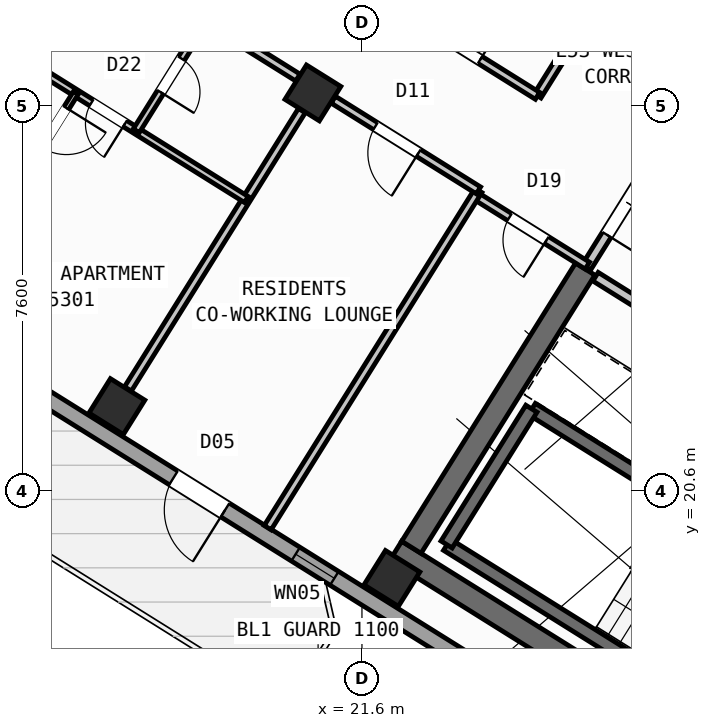
"""IFC4 building model, lengths in metres.
Left out: names, types, materials, properties, quantities, classifications, styles, units other than length and angle.
Written with IfcOpenShell. Run it as: python <this file> out.ifc"""

import sys

from ifc_helpers import new_model, si_unit, direction, frame, frame_2d, origin, origin_2d, place, context, subcontext, project, spatial, rectangle, hollow_rectangle, extrude, source, transform, mapped, element, fill, save


model = new_model("IFC4")
c1 = context("Model", 3, precision=1e-05, world=origin(), true_north=direction((0.0, 1.0)))
c2 = subcontext(c1, "Body", "Model", "MODEL_VIEW")
j1 = project(units=[si_unit("LENGTHUNIT", "METRE"), si_unit("PLANEANGLEUNIT", "RADIAN")], contexts=[c1])
p1 = place(None, origin())
s1 = spatial("IfcSite", under=j1, at=p1, CompositionType="ELEMENT")
p2 = place(p1, origin())
s2 = spatial("IfcBuilding", under=s1, at=p2, CompositionType="ELEMENT")
p3 = place(p2, frame((0.0, 0.0, 211.2)))
s3 = spatial("IfcBuildingStorey", under=s2, at=p3, CompositionType="ELEMENT", Elevation=211.2)
p4 = place(p3, frame((33.324, 12.503, 0.0), z_axis=(0.0, 0.0, 1.0), x_axis=(-0.848043529849, 0.529926571782, 0.0)))
e1 = element("IfcWall", 1, at=p4, inside=s3, PredefinedType="SHEAR", context=c2, shape_type="SweptSolid", body=[
    extrude(rectangle(XDim=13.04, YDim=0.45, at=frame_2d((6.52, 0.0))), origin(), (0.0, 0.0, 1.0), 3.35),
])
p5 = place(p3, frame((26.007, 24.976, 0.0), z_axis=(0.0, 0.0, 1.0), x_axis=(-0.529931155655, -0.848040665456, 0.0)))
e2 = element("IfcWall", 2, at=p5, inside=s3, PredefinedType="SHEAR", context=c2, shape_type="SweptSolid", body=[
    extrude(rectangle(XDim=6.475, YDim=0.45, at=frame_2d((3.238, 0.0))), origin(), (0.0, 0.0, 1.0), 3.35),
])
m1 = source(origin(), c2, "Body", "SweptSolid", [
    extrude(hollow_rectangle(XDim=0.8, YDim=0.8, WallThickness=0.032, at=origin_2d()), origin(), (0.0, 0.0, 1.0), 3.6),
])
for number, where, z_axis, x_axis in (
    (3, (22.191, 18.87, 0.0), (0.0, 0.0, 1.0), (-0.848, 0.53, 0.0)),
    (4, (20.632, 28.452, 0.0), (0.0, 0.0, 1.0), (-0.848, 0.53, 0.0)),
    (5, (16.764, 22.261, 0.0), (0.0, 0.0, 1.0), (-0.848, 0.53, 0.0)),
):
    element("IfcColumn", number, at=place(p3, frame(where, z_axis=z_axis, x_axis=x_axis)), inside=s3, PredefinedType="COLUMN", context=c2, shape_type="MappedRepresentation", body=[
        mapped(m1, transform((0.0, 0.0, 0.0), scale=1.0)),
    ])
p6 = place(p3, frame((31.76, 12.183, 0.0), z_axis=(0.0, 0.0, 1.0), x_axis=(-0.848047074256, 0.529920899612, 0.0)))
e6 = element("IfcWall", 6, at=p6, inside=s3, PredefinedType="STANDARD", context=c2, shape_type="SweptSolid", body=[
    extrude(rectangle(XDim=30.652, YDim=0.32, at=frame_2d((15.326, 0.0))), origin(), (0.0, 0.0, 1.0), 3.35),
])
p7 = place(p6, frame((15.166, 0.0, 0.0)))
e7 = element("IfcOpeningElement", 7, at=p7, cuts=e6, PredefinedType="OPENING", context=c2, shape_type="SweptSolid", body=[
    extrude(rectangle(XDim=1.2, YDim=2.15, at=frame_2d((0.6, 1.075))), frame((0.0, 0.17, 0.0), z_axis=(0.0, -1.0, 0.0), x_axis=(1.0, 0.0, 0.0)), (0.0, 0.0, 1.0), 0.34),
])
p8 = place(p6, frame((2.24, 0.0, 0.9)))
e8 = element("IfcOpeningElement", 8, at=p8, cuts=e6, PredefinedType="OPENING", context=c2, shape_type="SweptSolid", body=[
    extrude(rectangle(XDim=1.65, YDim=1.45, at=frame_2d((0.825, 0.725))), frame((0.0, 0.17, 0.0), z_axis=(0.0, -1.0, 0.0), x_axis=(1.0, 0.0, 0.0)), (0.0, 0.0, 1.0), 0.34),
])
p9 = place(p6, frame((7.469, 0.0, 0.9)))
e9 = element("IfcOpeningElement", 9, at=p9, cuts=e6, PredefinedType="OPENING", context=c2, shape_type="SweptSolid", body=[
    extrude(rectangle(XDim=1.65, YDim=1.45, at=frame_2d((0.825, 0.725))), frame((0.0, 0.17, 0.0), z_axis=(0.0, -1.0, 0.0), x_axis=(1.0, 0.0, 0.0)), (0.0, 0.0, 1.0), 0.34),
])
p10 = place(p6, frame((12.623, 0.0, 1.0)))
e10 = element("IfcOpeningElement", 10, at=p10, cuts=e6, PredefinedType="OPENING", context=c2, shape_type="SweptSolid", body=[
    extrude(rectangle(XDim=0.9, YDim=1.25, at=frame_2d((0.45, 0.625))), frame((0.0, 0.17, 0.0), z_axis=(0.0, -1.0, 0.0), x_axis=(1.0, 0.0, 0.0)), (0.0, 0.0, 1.0), 0.34),
])
p11 = place(p6, frame((19.715, 0.0, 1.0)))
e11 = element("IfcOpeningElement", 11, at=p11, cuts=e6, PredefinedType="OPENING", context=c2, shape_type="SweptSolid", body=[
    extrude(rectangle(XDim=0.9, YDim=1.25, at=frame_2d((0.45, 0.625))), frame((0.0, 0.17, 0.0), z_axis=(0.0, -1.0, 0.0), x_axis=(1.0, 0.0, 0.0)), (0.0, 0.0, 1.0), 0.34),
])
p12 = place(p6, frame((25.566, 0.0, 0.9)))
e12 = element("IfcOpeningElement", 12, at=p12, cuts=e6, PredefinedType="OPENING", context=c2, shape_type="SweptSolid", body=[
    extrude(rectangle(XDim=1.65, YDim=1.45, at=frame_2d((0.825, 0.725))), frame((0.0, 0.17, 0.0), z_axis=(0.0, -1.0, 0.0), x_axis=(1.0, 0.0, 0.0)), (0.0, 0.0, 1.0), 0.34),
])
p13 = place(p6, frame((28.896, 0.0, 1.0)))
e13 = element("IfcOpeningElement", 13, at=p13, cuts=e6, PredefinedType="OPENING", context=c2, shape_type="SweptSolid", body=[
    extrude(rectangle(XDim=0.9, YDim=1.25, at=frame_2d((0.45, 0.625))), frame((0.0, 0.17, 0.0), z_axis=(0.0, -1.0, 0.0), x_axis=(1.0, 0.0, 0.0)), (0.0, 0.0, 1.0), 0.34),
])
p14 = place(p3, frame((5.7, 28.71, 0.0), z_axis=(0.0, 0.0, 1.0), x_axis=(0.529923711467, 0.8480453172, 0.0)))
e14 = element("IfcWall", 14, at=p14, inside=s3, PredefinedType="STANDARD", context=c2, shape_type="SweptSolid", body=[
    extrude(rectangle(XDim=21.587, YDim=0.32, at=frame_2d((10.794, 0.0))), origin(), (0.0, 0.0, 1.0), 2.825),
])
p15 = place(p14, frame((2.184, 0.0, 0.9)))
e15 = element("IfcOpeningElement", 15, at=p15, cuts=e14, PredefinedType="OPENING", context=c2, shape_type="SweptSolid", body=[
    extrude(rectangle(XDim=1.65, YDim=1.45, at=frame_2d((0.825, 0.725))), frame((0.0, 0.17, 0.0), z_axis=(0.0, -1.0, 0.0), x_axis=(1.0, 0.0, 0.0)), (0.0, 0.0, 1.0), 0.34),
])
p16 = place(p14, frame((11.709, 0.0, 0.9)))
e16 = element("IfcOpeningElement", 16, at=p16, cuts=e14, PredefinedType="OPENING", context=c2, shape_type="SweptSolid", body=[
    extrude(rectangle(XDim=1.35, YDim=1.45, at=frame_2d((0.675, 0.725))), frame((0.0, 0.17, 0.0), z_axis=(0.0, -1.0, 0.0), x_axis=(1.0, 0.0, 0.0)), (0.0, 0.0, 1.0), 0.34),
])
p17 = place(p14, frame((17.181, 0.0, 0.95)))
e17 = element("IfcOpeningElement", 17, at=p17, cuts=e14, PredefinedType="OPENING", context=c2, shape_type="SweptSolid", body=[
    extrude(rectangle(XDim=1.95, YDim=1.35, at=frame_2d((0.975, 0.675))), frame((0.0, 0.17, 0.0), z_axis=(0.0, -1.0, 0.0), x_axis=(1.0, 0.0, 0.0)), (0.0, 0.0, 1.0), 0.34),
])
p18 = place(p3, frame((29.605, 15.581, 0.0), z_axis=(0.0, 0.0, 1.0), x_axis=(-0.848036911448, 0.529937163087, 0.0)))
e18 = element("IfcWall", 18, at=p18, inside=s3, PredefinedType="SHEAR", context=c2, shape_type="SweptSolid", body=[
    extrude(rectangle(XDim=7.46, YDim=0.26, at=frame_2d((3.73, 0.0))), origin(), (0.0, 0.0, 1.0), 3.35),
])
p19 = place(p3, frame((31.28, 18.261, 0.0), z_axis=(0.0, 0.0, 1.0), x_axis=(-0.848051618787, 0.529913626805, 0.0)))
e19 = element("IfcWall", 19, at=p19, inside=s3, PredefinedType="SHEAR", context=c2, shape_type="SweptSolid", body=[
    extrude(rectangle(XDim=7.46, YDim=0.26, at=frame_2d((3.73, 0.0))), origin(), (0.0, 0.0, 1.0), 3.35),
])
p20 = place(p19, frame((0.36, 0.0, 0.0)))
e20 = element("IfcOpeningElement", 20, at=p20, cuts=e19, PredefinedType="OPENING", context=c2, shape_type="SweptSolid", body=[
    extrude(rectangle(XDim=0.86, YDim=2.05, at=frame_2d((0.43, 1.025))), frame((0.0, 0.14, 0.0), z_axis=(0.0, -1.0, 0.0), x_axis=(1.0, 0.0, 0.0)), (0.0, 0.0, 1.0), 0.28),
])
p21 = place(p3, frame((24.945, 22.22, 0.0), z_axis=(0.0, 0.0, 1.0), x_axis=(-0.529908658664, -0.84805472316, 0.0)))
e21 = element("IfcWall", 21, at=p21, inside=s3, PredefinedType="SHEAR", context=c2, shape_type="SweptSolid", body=[
    extrude(rectangle(XDim=3.16, YDim=0.26, at=frame_2d((1.58, 0.0))), origin(), (0.0, 0.0, 1.0), 3.35),
])
p22 = place(p3, frame((31.525, 21.504, 0.0), z_axis=(0.0, 0.0, 1.0), x_axis=(-0.848042066329, 0.529928913853, 0.0)))
e22 = element("IfcWall", 22, at=p22, inside=s3, PredefinedType="STANDARD", context=c2, shape_type="SweptSolid", body=[
    extrude(rectangle(XDim=6.268, YDim=0.2, at=frame_2d((3.134, 0.0))), origin(), (0.0, 0.0, 1.0), 3.34),
])
p23 = place(p22, frame((4.4, 0.0, 0.0)))
e23 = element("IfcOpeningElement", 23, at=p23, cuts=e22, PredefinedType="OPENING", context=c2, shape_type="SweptSolid", body=[
    extrude(rectangle(XDim=0.86, YDim=2.05, at=frame_2d((0.43, 1.025))), frame((0.0, 0.11, 0.0), z_axis=(0.0, -1.0, 0.0), x_axis=(1.0, 0.0, 0.0)), (0.0, 0.0, 1.0), 0.22),
])
p24 = place(p22, frame((1.45, 0.0, 0.0)))
e24 = element("IfcOpeningElement", 24, at=p24, cuts=e22, PredefinedType="OPENING", context=c2, shape_type="SweptSolid", body=[
    extrude(rectangle(XDim=0.86, YDim=2.05, at=frame_2d((0.43, 1.025))), frame((0.0, 0.11, 0.0), z_axis=(0.0, -1.0, 0.0), x_axis=(1.0, 0.0, 0.0)), (0.0, 0.0, 1.0), 0.22),
])
p25 = place(p3, frame((27.596, 27.52, 0.0), z_axis=(0.0, 0.0, 1.0), x_axis=(-0.529865479138, -0.848081702443, 0.0)))
e25 = element("IfcWall", 25, at=p25, inside=s3, PredefinedType="STANDARD", context=c2, shape_type="SweptSolid", body=[
    extrude(rectangle(XDim=2.96, YDim=0.2, at=frame_2d((1.48, 0.0))), origin(), (0.0, 0.0, 1.0), 3.34),
])
p26 = place(p25, frame((0.7, 0.0, 0.0)))
e26 = element("IfcOpeningElement", 26, at=p26, cuts=e25, PredefinedType="OPENING", context=c2, shape_type="SweptSolid", body=[
    extrude(rectangle(XDim=1.5, YDim=2.15, at=frame_2d((0.75, 1.075))), frame((0.0, 0.11, 0.0), z_axis=(0.0, -1.0, 0.0), x_axis=(1.0, 0.0, 0.0)), (0.0, 0.0, 1.0), 0.22),
])
p27 = place(p3, frame((26.049, 25.044, 0.0), z_axis=(0.0, 0.0, 1.0), x_axis=(-0.848050851465, 0.529914854792, 0.0)))
e27 = element("IfcWall", 27, at=p27, inside=s3, PredefinedType="PARTITIONING", context=c2, shape_type="SweptSolid", body=[
    extrude(rectangle(XDim=2.61, YDim=0.16, at=frame_2d((1.305, 0.0))), origin(), (0.0, 0.0, 1.0), 2.825),
])
p28 = place(p27, frame((0.95, 0.0, 0.0)))
e28 = element("IfcOpeningElement", 28, at=p28, cuts=e27, PredefinedType="OPENING", context=c2, shape_type="SweptSolid", body=[
    extrude(rectangle(XDim=0.86, YDim=2.05, at=frame_2d((0.43, 1.025))), frame((0.0, 0.09, 0.0), z_axis=(0.0, -1.0, 0.0), x_axis=(1.0, 0.0, 0.0)), (0.0, 0.0, 1.0), 0.18),
])
p29 = place(p3, frame((31.239, 38.274, 0.0), z_axis=(0.0, 0.0, 1.0), x_axis=(-0.529925472745, -0.848044216616, 0.0)))
e29 = element("IfcWall", 29, at=p29, inside=s3, PredefinedType="PARTITIONING", context=c2, shape_type="SweptSolid", body=[
    extrude(rectangle(XDim=11.65, YDim=0.16, at=frame_2d((5.825, 0.0))), origin(), (0.0, 0.0, 1.0), 3.34),
])
p30 = place(p3, frame((23.899, 26.529, 0.0), z_axis=(0.0, 0.0, 1.0), x_axis=(-0.529920662441, -0.848047222457, 0.0)))
e30 = element("IfcWall", 30, at=p30, inside=s3, PredefinedType="PARTITIONING", context=c2, shape_type="SweptSolid", body=[
    extrude(rectangle(XDim=7.85, YDim=0.16, at=frame_2d((3.925, 0.0))), origin(), (0.0, 0.0, 1.0), 3.34),
])
p31 = place(p3, frame((25.065, 28.394, 0.0), z_axis=(0.0, 0.0, 1.0), x_axis=(-0.848048310262, 0.529918921593, 0.0)))
e31 = element("IfcWall", 31, at=p31, inside=s3, PredefinedType="PARTITIONING", context=c2, shape_type="SweptSolid", body=[
    extrude(rectangle(XDim=16.73, YDim=0.16, at=frame_2d((8.365, 0.0))), origin(), (0.0, 0.0, 1.0), 3.34),
])
p32 = place(p31, frame((1.338, 0.0, 0.0)))
e32 = element("IfcOpeningElement", 32, at=p32, cuts=e31, PredefinedType="OPENING", context=c2, shape_type="SweptSolid", body=[
    extrude(rectangle(XDim=1.0, YDim=2.1, at=frame_2d((0.5, 1.05))), frame((0.0, 0.09, 0.0), z_axis=(0.0, -1.0, 0.0), x_axis=(1.0, 0.0, 0.0)), (0.0, 0.0, 1.0), 0.18),
])
p33 = place(p31, frame((5.265, 0.0, 0.0)))
e33 = element("IfcOpeningElement", 33, at=p33, cuts=e31, PredefinedType="OPENING", context=c2, shape_type="SweptSolid", body=[
    extrude(rectangle(XDim=1.0, YDim=2.1, at=frame_2d((0.5, 1.05))), frame((0.0, 0.09, 0.0), z_axis=(0.0, -1.0, 0.0), x_axis=(1.0, 0.0, 0.0)), (0.0, 0.0, 1.0), 0.18),
])
p34 = place(p31, frame((9.526, 0.0, 0.0)))
e34 = element("IfcOpeningElement", 34, at=p34, cuts=e31, PredefinedType="OPENING", context=c2, shape_type="SweptSolid", body=[
    extrude(rectangle(XDim=1.0, YDim=2.1, at=frame_2d((0.5, 1.05))), frame((0.0, 0.09, 0.0), z_axis=(0.0, -1.0, 0.0), x_axis=(1.0, 0.0, 0.0)), (0.0, 0.0, 1.0), 0.18),
])
p35 = place(p31, frame((13.954, 0.0, 0.0)))
e35 = element("IfcOpeningElement", 35, at=p35, cuts=e31, PredefinedType="OPENING", context=c2, shape_type="SweptSolid", body=[
    extrude(rectangle(XDim=1.0, YDim=2.1, at=frame_2d((0.5, 1.05))), frame((0.0, 0.09, 0.0), z_axis=(0.0, -1.0, 0.0), x_axis=(1.0, 0.0, 0.0)), (0.0, 0.0, 1.0), 0.18),
])
p36 = place(p3, frame((23.899, 26.529, 0.0), z_axis=(0.0, 0.0, 1.0), x_axis=(-0.848055143312, 0.529907986259, 0.0)))
e36 = element("IfcWall", 36, at=p36, inside=s3, PredefinedType="PARTITIONING", context=c2, shape_type="SweptSolid", body=[
    extrude(rectangle(XDim=3.378, YDim=0.16, at=frame_2d((1.689, 0.0))), origin(), (0.0, 0.0, 1.0), 2.825),
])
p37 = place(p36, frame((1.395, 0.0, 0.0)))
e37 = element("IfcOpeningElement", 37, at=p37, cuts=e36, PredefinedType="OPENING", context=c2, shape_type="SweptSolid", body=[
    extrude(rectangle(XDim=1.0, YDim=2.1, at=frame_2d((0.5, 1.05))), frame((0.0, 0.09, 0.0), z_axis=(0.0, -1.0, 0.0), x_axis=(1.0, 0.0, 0.0)), (0.0, 0.0, 1.0), 0.18),
])
p38 = place(p3, frame((20.336, 28.755, 0.0), z_axis=(0.0, 0.0, 1.0), x_axis=(-0.848049955116, 0.529916289265, 0.0)))
e38 = element("IfcWall", 38, at=p38, inside=s3, PredefinedType="PARTITIONING", context=c2, shape_type="SweptSolid", body=[
    extrude(rectangle(XDim=5.576, YDim=0.16, at=frame_2d((2.788, 0.0))), origin(), (0.0, 0.0, 1.0), 2.825),
])
p39 = place(p38, frame((3.618, 0.0, 0.0)))
e39 = element("IfcOpeningElement", 39, at=p39, cuts=e38, PredefinedType="OPENING", context=c2, shape_type="SweptSolid", body=[
    extrude(rectangle(XDim=1.0, YDim=2.1, at=frame_2d((0.5, 1.05))), frame((0.0, 0.09, 0.0), z_axis=(0.0, -1.0, 0.0), x_axis=(1.0, 0.0, 0.0)), (0.0, 0.0, 1.0), 0.18),
])
p40 = place(p3, frame((20.414, 28.103, 0.0), z_axis=(0.0, 0.0, 1.0), x_axis=(-0.529934553702, -0.848038542045, 0.0)))
e40 = element("IfcWall", 40, at=p40, inside=s3, PredefinedType="PARTITIONING", context=c2, shape_type="SweptSolid", body=[
    extrude(rectangle(XDim=6.476, YDim=0.16, at=frame_2d((3.238, 0.0))), origin(), (0.0, 0.0, 1.0), 2.825),
])
p41 = place(p3, frame((19.318, 26.349, 0.0), z_axis=(0.0, 0.0, 1.0), x_axis=(-0.848039019877, 0.529933789039, 0.0)))
e41 = element("IfcWall", 41, at=p41, inside=s3, PredefinedType="PLUMBINGWALL", context=c2, shape_type="SweptSolid", body=[
    extrude(rectangle(XDim=6.4, YDim=0.14, at=frame_2d((3.2, 0.0))), origin(), (0.0, 0.0, 1.0), 3.34),
])
p42 = place(p41, frame((2.824, 0.0, 0.0)))
e42 = element("IfcOpeningElement", 42, at=p42, cuts=e41, PredefinedType="OPENING", context=c2, shape_type="SweptSolid", body=[
    extrude(rectangle(XDim=0.78, YDim=2.05, at=frame_2d((0.39, 1.025))), frame((0.0, 0.08, 0.0), z_axis=(0.0, -1.0, 0.0), x_axis=(1.0, 0.0, 0.0)), (0.0, 0.0, 1.0), 0.16),
])
p43 = place(p3, frame((18.514, 29.894, 0.0), z_axis=(0.0, 0.0, 1.0), x_axis=(-0.529913878929, -0.848051461244, 0.0)))
e43 = element("IfcWall", 43, at=p43, inside=s3, PredefinedType="PLUMBINGWALL", context=c2, shape_type="SweptSolid", body=[
    extrude(rectangle(XDim=2.58, YDim=0.14, at=frame_2d((1.29, 0.0))), origin(), (0.0, 0.0, 1.0), 3.34),
])
p44 = place(p43, frame((0.9, 0.0, 0.0)))
e44 = element("IfcOpeningElement", 44, at=p44, cuts=e43, PredefinedType="OPENING", context=c2, shape_type="SweptSolid", body=[
    extrude(rectangle(XDim=0.78, YDim=2.05, at=frame_2d((0.39, 1.025))), frame((0.0, 0.08, 0.0), z_axis=(0.0, -1.0, 0.0), x_axis=(1.0, 0.0, 0.0)), (0.0, 0.0, 1.0), 0.16),
])
p45 = place(p3, frame((15.953, 28.452, 0.0), z_axis=(0.0, 0.0, 1.0), x_axis=(-0.529919714018, -0.848047815099, 0.0)))
e45 = element("IfcWall", 45, at=p45, inside=s3, PredefinedType="PARTITIONING", context=c2, shape_type="SweptSolid", body=[
    extrude(rectangle(XDim=5.54, YDim=0.11, at=frame_2d((2.77, 0.0))), origin(), (0.0, 0.0, 1.0), 3.34),
])
p46 = place(p45, frame((0.35, 0.0, 0.0)))
e46 = element("IfcOpeningElement", 46, at=p46, cuts=e45, PredefinedType="OPENING", context=c2, shape_type="SweptSolid", body=[
    extrude(rectangle(XDim=0.92, YDim=2.08, at=frame_2d((0.46, 1.04))), frame((0.0, 0.065, 0.0), z_axis=(0.0, -1.0, 0.0), x_axis=(1.0, 0.0, 0.0)), (0.0, 0.0, 1.0), 0.13),
])
m2 = source(origin(), c2, "Body", "SweptSolid", [
    extrude(rectangle(XDim=1.2, YDim=2.15, at=frame_2d((0.6, 1.075))), frame((0.0, 0.025, 0.0), z_axis=(0.0, -1.0, 0.0), x_axis=(1.0, 0.0, 0.0)), (0.0, 0.0, 1.0), 0.05),
])
p47 = place(p7, origin())
e47 = element("IfcDoor", 47, at=p47, inside=s3, OperationType="SINGLE_SWING_LEFT", PredefinedType="DOOR", context=c2, shape_type="MappedRepresentation", body=[
    mapped(m2, transform((0.0, 0.0, 0.0), scale=1.0)),
])
fill(e7, e47)
m3 = source(origin(), c2, "Body", "SweptSolid", [
    extrude(rectangle(XDim=0.9, YDim=1.25, at=frame_2d((0.45, 0.625))), frame((0.0, 0.03, 0.0), z_axis=(0.0, -1.0, 0.0), x_axis=(1.0, 0.0, 0.0)), (0.0, 0.0, 1.0), 0.06),
])
p48 = place(p10, origin())
e48 = element("IfcWindow", 48, at=p48, inside=s3, PartitioningType="SINGLE_PANEL", PredefinedType="WINDOW", context=c2, shape_type="MappedRepresentation", body=[
    mapped(m3, transform((0.0, 0.0, 0.0), scale=1.0)),
])
fill(e10, e48)
m4 = source(origin(), c2, "Body", "SweptSolid", [
    extrude(rectangle(XDim=0.86, YDim=2.05, at=frame_2d((0.43, 1.025))), frame((0.0, 0.025, 0.0), z_axis=(0.0, -1.0, 0.0), x_axis=(1.0, 0.0, 0.0)), (0.0, 0.0, 1.0), 0.05),
])
p49 = place(p28, origin())
e49 = element("IfcDoor", 49, at=p49, inside=s3, OperationType="SINGLE_SWING_LEFT", PredefinedType="DOOR", context=c2, shape_type="MappedRepresentation", body=[
    mapped(m4, transform((0.0, 0.0, 0.0), scale=1.0)),
])
fill(e28, e49)
m5 = source(origin(), c2, "Body", "SweptSolid", [
    extrude(rectangle(XDim=1.5, YDim=2.15, at=frame_2d((0.75, 1.075))), frame((0.0, 0.025, 0.0), z_axis=(0.0, -1.0, 0.0), x_axis=(1.0, 0.0, 0.0)), (0.0, 0.0, 1.0), 0.05),
])
p50 = place(p26, origin())
e50 = element("IfcDoor", 50, at=p50, inside=s3, OperationType="DOUBLE_DOOR_SINGLE_SWING", PredefinedType="DOOR", context=c2, shape_type="MappedRepresentation", body=[
    mapped(m5, transform((0.0, 0.0, 0.0), scale=1.0)),
])
fill(e26, e50)
m6 = source(origin(), c2, "Body", "SweptSolid", [
    extrude(rectangle(XDim=1.0, YDim=2.1, at=frame_2d((0.5, 1.05))), frame((0.0, 0.025, 0.0), z_axis=(0.0, -1.0, 0.0), x_axis=(1.0, 0.0, 0.0)), (0.0, 0.0, 1.0), 0.05),
])
p51 = place(p37, origin())
e51 = element("IfcDoor", 51, at=p51, inside=s3, OperationType="SINGLE_SWING_LEFT", PredefinedType="DOOR", context=c2, shape_type="MappedRepresentation", body=[
    mapped(m6, transform((0.0, 0.0, 0.0), scale=1.0)),
])
fill(e37, e51)
m7 = source(origin(), c2, "Body", "SweptSolid", [
    extrude(rectangle(XDim=0.92, YDim=2.08, at=frame_2d((0.46, 1.04))), frame((0.0, 0.025, 0.0), z_axis=(0.0, -1.0, 0.0), x_axis=(1.0, 0.0, 0.0)), (0.0, 0.0, 1.0), 0.05),
])
p52 = place(p46, origin())
e52 = element("IfcDoor", 52, at=p52, inside=s3, OperationType="SINGLE_SWING_LEFT", PredefinedType="DOOR", context=c2, shape_type="MappedRepresentation", body=[
    mapped(m7, transform((0.0, 0.0, 0.0), scale=1.0)),
])
fill(e46, e52)
m8 = source(origin(), c2, "Body", "SweptSolid", [
    extrude(rectangle(XDim=0.78, YDim=2.05, at=frame_2d((0.39, 1.025))), frame((0.0, 0.025, 0.0), z_axis=(0.0, -1.0, 0.0), x_axis=(1.0, 0.0, 0.0)), (0.0, 0.0, 1.0), 0.05),
])
p53 = place(p42, origin())
e53 = element("IfcDoor", 53, at=p53, inside=s3, OperationType="SINGLE_SWING_LEFT", PredefinedType="DOOR", context=c2, shape_type="MappedRepresentation", body=[
    mapped(m8, transform((0.0, 0.0, 0.0), scale=1.0)),
])
fill(e42, e53)
p54 = place(p44, origin())
e54 = element("IfcDoor", 54, at=p54, inside=s3, OperationType="SINGLE_SWING_RIGHT", PredefinedType="DOOR", context=c2, shape_type="MappedRepresentation", body=[
    mapped(m8, transform((0.0, 0.0, 0.0), scale=1.0)),
])
fill(e44, e54)
p55 = place(p32, frame((1.0, 0.0, 0.0), z_axis=(0.0, 0.0, 1.0), x_axis=(-1.0, 0.0, 0.0)))
e55 = element("IfcDoor", 55, at=p55, inside=s3, OperationType="SINGLE_SWING_RIGHT", PredefinedType="DOOR", context=c2, shape_type="MappedRepresentation", body=[
    mapped(m6, transform((0.0, 0.0, 0.0), scale=1.0)),
])
fill(e32, e55)
save(model, sys.argv[1])
